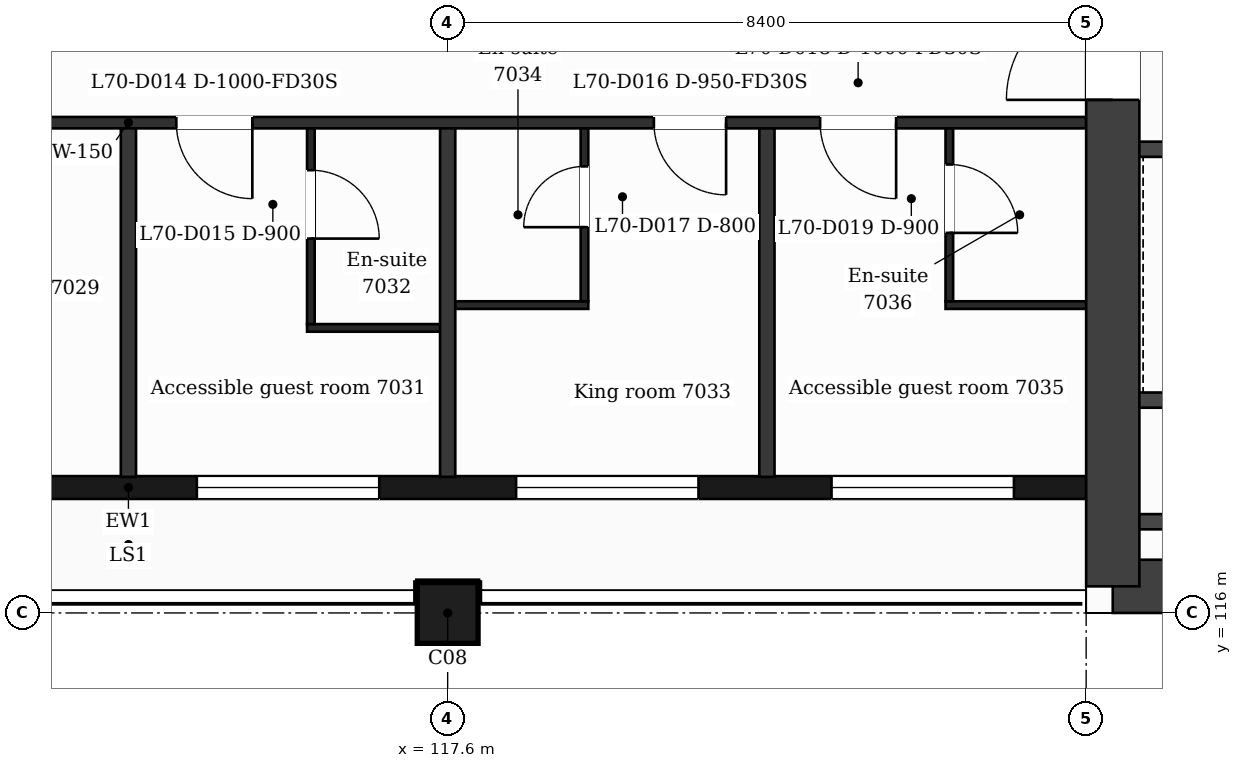
"""IFC4 building model, lengths in metres.
Left out: names, types, materials, properties, quantities, classifications, styles, units other than length and angle.
Written with IfcOpenShell. Run it as: python <this file> out.ifc"""

import sys

from ifc_helpers import new_model, si_unit, direction, frame, frame_2d, origin, origin_2d, place, context, subcontext, project, spatial, rectangle, extrude, element, fill, save


model = new_model("IFC4")
c1 = context("Model", 3, precision=1e-05, world=origin(), true_north=direction((0.0, 1.0)))
c2 = subcontext(c1, "Body", "Model", "MODEL_VIEW")
j1 = project(units=[si_unit("LENGTHUNIT", "METRE"), si_unit("PLANEANGLEUNIT", "RADIAN")], contexts=[c1])
p1 = place(None, origin())
s1 = spatial("IfcSite", under=j1, at=p1, CompositionType="ELEMENT")
p2 = place(p1, origin())
s2 = spatial("IfcBuilding", under=s1, at=p2, CompositionType="ELEMENT")
p3 = place(p2, frame((0.0, 0.0, 288.6)))
s3 = spatial("IfcBuildingStorey", under=s2, at=p3, CompositionType="ELEMENT", Elevation=288.6)
p4 = place(p3, frame((139.977, 116.35, 0.0), z_axis=(0.0, 0.0, 1.0), x_axis=(-1.0, 0.0, 0.0)))
e1 = element("IfcWall", 1, at=p4, inside=s3, PredefinedType="SHEAR", context=c2, shape_type="SweptSolid", body=[
    extrude(rectangle(XDim=13.626, YDim=0.7, at=frame_2d((6.813, 0.0))), origin(), (0.0, 0.0, 1.0), 3.7),
])
p5 = place(p3, frame((126.35, 116.35, 0.0), z_axis=(0.0, 0.0, 1.0), x_axis=(0.0, 1.0, 0.0)))
e2 = element("IfcWall", 2, at=p5, inside=s3, PredefinedType="SHEAR", context=c2, shape_type="SweptSolid", body=[
    extrude(rectangle(XDim=15.7, YDim=0.7, at=frame_2d((7.85, 0.0))), origin(), (0.0, 0.0, 1.0), 3.7),
])
p6 = place(p5, frame((6.4, 0.0, 0.0)))
e3 = element("IfcOpeningElement", 3, at=p6, cuts=e2, PredefinedType="OPENING", context=c2, shape_type="SweptSolid", body=[
    extrude(rectangle(XDim=1.4, YDim=2.1, at=frame_2d((0.7, 1.05))), frame((0.0, 0.36, 0.0), z_axis=(0.0, -1.0, 0.0), x_axis=(1.0, 0.0, 0.0)), (0.0, 0.0, 1.0), 0.72),
])
p7 = place(p3, frame((117.6, 116.0, 0.0), z_axis=(0.0, 0.0, 1.0), x_axis=(1.0, 0.0, 0.0)))
e4 = element("IfcColumn", 4, at=p7, inside=s3, PredefinedType="COLUMN", context=c2, shape_type="SweptSolid", body=[
    extrude(rectangle(XDim=0.8, YDim=0.8, at=origin_2d()), origin(), (0.0, 0.0, 1.0), 3.7),
])
p8 = place(p3, frame((100.8, 117.65, 0.0), z_axis=(0.0, 0.0, 1.0), x_axis=(1.0, 0.0, 0.0)))
e5 = element("IfcWall", 5, at=p8, inside=s3, PredefinedType="SOLIDWALL", context=c2, shape_type="SweptSolid", body=[
    extrude(rectangle(XDim=25.2, YDim=0.3, at=frame_2d((12.6, 0.0))), origin(), (0.0, 0.0, 1.0), 3.38),
])
p9 = place(p8, frame((1.55, 0.0, 0.9)))
e6 = element("IfcOpeningElement", 6, at=p9, cuts=e5, PredefinedType="OPENING", context=c2, shape_type="SweptSolid", body=[
    extrude(rectangle(XDim=1.2, YDim=2.1, at=frame_2d((0.6, 1.05))), frame((0.0, 0.16, 0.0), z_axis=(0.0, -1.0, 0.0), x_axis=(1.0, 0.0, 0.0)), (0.0, 0.0, 1.0), 0.32),
])
p10 = place(p8, frame((5.1, 0.0, 0.9)))
e7 = element("IfcOpeningElement", 7, at=p10, cuts=e5, PredefinedType="OPENING", context=c2, shape_type="SweptSolid", body=[
    extrude(rectangle(XDim=2.4, YDim=2.1, at=frame_2d((1.2, 1.05))), frame((0.0, 0.16, 0.0), z_axis=(0.0, -1.0, 0.0), x_axis=(1.0, 0.0, 0.0)), (0.0, 0.0, 1.0), 0.32),
])
p11 = place(p8, frame((9.9, 0.0, 0.0)))
e8 = element("IfcOpeningElement", 8, at=p11, cuts=e5, PredefinedType="OPENING", context=c2, shape_type="SweptSolid", body=[
    extrude(rectangle(XDim=1.2, YDim=2.4, at=frame_2d((0.6, 1.2))), frame((0.0, 0.16, 0.0), z_axis=(0.0, -1.0, 0.0), x_axis=(1.0, 0.0, 0.0)), (0.0, 0.0, 1.0), 0.32),
])
p12 = place(p8, frame((13.5, 0.0, 0.9)))
e9 = element("IfcOpeningElement", 9, at=p12, cuts=e5, PredefinedType="OPENING", context=c2, shape_type="SweptSolid", body=[
    extrude(rectangle(XDim=2.4, YDim=2.1, at=frame_2d((1.2, 1.05))), frame((0.0, 0.16, 0.0), z_axis=(0.0, -1.0, 0.0), x_axis=(1.0, 0.0, 0.0)), (0.0, 0.0, 1.0), 0.32),
])
p13 = place(p8, frame((17.7, 0.0, 0.9)))
e10 = element("IfcOpeningElement", 10, at=p13, cuts=e5, PredefinedType="OPENING", context=c2, shape_type="SweptSolid", body=[
    extrude(rectangle(XDim=2.4, YDim=2.1, at=frame_2d((1.2, 1.05))), frame((0.0, 0.16, 0.0), z_axis=(0.0, -1.0, 0.0), x_axis=(1.0, 0.0, 0.0)), (0.0, 0.0, 1.0), 0.32),
])
p14 = place(p8, frame((21.85, 0.0, 0.9)))
e11 = element("IfcOpeningElement", 11, at=p14, cuts=e5, PredefinedType="OPENING", context=c2, shape_type="SweptSolid", body=[
    extrude(rectangle(XDim=2.4, YDim=2.1, at=frame_2d((1.2, 1.05))), frame((0.0, 0.16, 0.0), z_axis=(0.0, -1.0, 0.0), x_axis=(1.0, 0.0, 0.0)), (0.0, 0.0, 1.0), 0.32),
])
for number, where, z_axis, x_axis in (
    (12, (126.7, 117.2, 0.0), (0.0, 0.0, 1.0), (1.0, 0.0, 0.0)),
    (13, (126.7, 118.8, 0.0), (0.0, 0.0, 1.0), (1.0, 0.0, 0.0)),
):
    element("IfcWall", number, at=place(p3, frame(where, z_axis=z_axis, x_axis=x_axis)), inside=s3, PredefinedType="PARTITIONING", context=c2, shape_type="SweptSolid", body=[
        extrude(rectangle(XDim=4.873, YDim=0.2, at=frame_2d((2.437, 0.0))), origin(), (0.0, 0.0, 1.0), 3.38),
    ])
p15 = place(p3, frame((115.75, 119.75, 0.0), z_axis=(0.0, 0.0, 1.0), x_axis=(1.0, 0.0, 0.0)))
e14 = element("IfcWall", 14, at=p15, inside=s3, PredefinedType="PARTITIONING", context=c2, shape_type="SweptSolid", body=[
    extrude(rectangle(XDim=1.85, YDim=0.1, at=frame_2d((0.925, 0.0))), origin(), (0.0, 0.0, 1.0), 3.38),
])
p16 = place(p3, frame((117.6, 120.05, 0.0), z_axis=(0.0, 0.0, 1.0), x_axis=(1.0, 0.0, 0.0)))
e15 = element("IfcWall", 15, at=p16, inside=s3, PredefinedType="PARTITIONING", context=c2, shape_type="SweptSolid", body=[
    extrude(rectangle(XDim=1.85, YDim=0.1, at=frame_2d((0.925, 0.0))), origin(), (0.0, 0.0, 1.0), 3.38),
])
p17 = place(p3, frame((124.15, 120.05, 0.0), z_axis=(0.0, 0.0, 1.0), x_axis=(1.0, 0.0, 0.0)))
e16 = element("IfcWall", 16, at=p17, inside=s3, PredefinedType="PARTITIONING", context=c2, shape_type="SweptSolid", body=[
    extrude(rectangle(XDim=1.85, YDim=0.1, at=frame_2d((0.925, 0.0))), origin(), (0.0, 0.0, 1.0), 3.38),
])
p18 = place(p3, frame((126.7, 122.1, 0.0), z_axis=(0.0, 0.0, 1.0), x_axis=(1.0, 0.0, 0.0)))
e17 = element("IfcWall", 17, at=p18, inside=s3, PredefinedType="PARTITIONING", context=c2, shape_type="SweptSolid", body=[
    extrude(rectangle(XDim=4.873, YDim=0.2, at=frame_2d((2.437, 0.0))), origin(), (0.0, 0.0, 1.0), 3.38),
])
p19 = place(p18, frame((3.105, 0.0, 0.0)))
e18 = element("IfcOpeningElement", 18, at=p19, cuts=e17, PredefinedType="OPENING", context=c2, shape_type="SweptSolid", body=[
    extrude(rectangle(XDim=1.1, YDim=2.1, at=frame_2d((0.55, 1.05))), frame((0.0, 0.11, 0.0), z_axis=(0.0, -1.0, 0.0), x_axis=(1.0, 0.0, 0.0)), (0.0, 0.0, 1.0), 0.22),
])
p20 = place(p18, frame((0.732, 0.0, 0.0)))
e19 = element("IfcOpeningElement", 19, at=p20, cuts=e17, PredefinedType="OPENING", context=c2, shape_type="SweptSolid", body=[
    extrude(rectangle(XDim=1.1, YDim=2.1, at=frame_2d((0.55, 1.05))), frame((0.0, 0.11, 0.0), z_axis=(0.0, -1.0, 0.0), x_axis=(1.0, 0.0, 0.0)), (0.0, 0.0, 1.0), 0.22),
])
p21 = place(p3, frame((100.8, 122.45, 0.0), z_axis=(0.0, 0.0, 1.0), x_axis=(1.0, 0.0, 0.0)))
e20 = element("IfcWall", 20, at=p21, inside=s3, PredefinedType="PARTITIONING", context=c2, shape_type="SweptSolid", body=[
    extrude(rectangle(XDim=25.2, YDim=0.15, at=frame_2d((12.6, 0.0))), origin(), (0.0, 0.0, 1.0), 3.38),
])
p22 = place(p21, frame((0.55, 0.0, 0.0)))
e21 = element("IfcOpeningElement", 21, at=p22, cuts=e20, PredefinedType="OPENING", context=c2, shape_type="SweptSolid", body=[
    extrude(rectangle(XDim=1.0, YDim=2.1, at=frame_2d((0.5, 1.05))), frame((0.0, 0.085, 0.0), z_axis=(0.0, -1.0, 0.0), x_axis=(1.0, 0.0, 0.0)), (0.0, 0.0, 1.0), 0.17),
])
p23 = place(p21, frame((9.375, 0.0, 0.0)))
e22 = element("IfcOpeningElement", 22, at=p23, cuts=e20, PredefinedType="OPENING", context=c2, shape_type="SweptSolid", body=[
    extrude(rectangle(XDim=1.0, YDim=2.1, at=frame_2d((0.5, 1.05))), frame((0.0, 0.085, 0.0), z_axis=(0.0, -1.0, 0.0), x_axis=(1.0, 0.0, 0.0)), (0.0, 0.0, 1.0), 0.17),
])
p24 = place(p21, frame((13.23, 0.0, 0.0)))
e23 = element("IfcOpeningElement", 23, at=p24, cuts=e20, PredefinedType="OPENING", context=c2, shape_type="SweptSolid", body=[
    extrude(rectangle(XDim=1.0, YDim=2.1, at=frame_2d((0.5, 1.05))), frame((0.0, 0.085, 0.0), z_axis=(0.0, -1.0, 0.0), x_axis=(1.0, 0.0, 0.0)), (0.0, 0.0, 1.0), 0.17),
])
p25 = place(p21, frame((19.513, 0.0, 0.0)))
e24 = element("IfcOpeningElement", 24, at=p25, cuts=e20, PredefinedType="OPENING", context=c2, shape_type="SweptSolid", body=[
    extrude(rectangle(XDim=0.95, YDim=2.1, at=frame_2d((0.475, 1.05))), frame((0.0, 0.085, 0.0), z_axis=(0.0, -1.0, 0.0), x_axis=(1.0, 0.0, 0.0)), (0.0, 0.0, 1.0), 0.17),
])
p26 = place(p21, frame((21.7, 0.0, 0.0)))
e25 = element("IfcOpeningElement", 25, at=p26, cuts=e20, PredefinedType="OPENING", context=c2, shape_type="SweptSolid", body=[
    extrude(rectangle(XDim=1.0, YDim=2.1, at=frame_2d((0.5, 1.05))), frame((0.0, 0.085, 0.0), z_axis=(0.0, -1.0, 0.0), x_axis=(1.0, 0.0, 0.0)), (0.0, 0.0, 1.0), 0.17),
])
p27 = place(p3, frame((113.4, 117.79, 0.0), z_axis=(0.0, 0.0, 1.0), x_axis=(0.0, 1.0, 0.0)))
e26 = element("IfcWall", 26, at=p27, inside=s3, PredefinedType="PARTITIONING", context=c2, shape_type="SweptSolid", body=[
    extrude(rectangle(XDim=4.585, YDim=0.2, at=frame_2d((2.292, 0.0))), origin(), (0.0, 0.0, 1.0), 3.38),
])
p28 = place(p3, frame((115.8, 119.8, 0.0), z_axis=(0.0, 0.0, 1.0), x_axis=(0.0, 1.0, 0.0)))
e27 = element("IfcWall", 27, at=p28, inside=s3, PredefinedType="PARTITIONING", context=c2, shape_type="SweptSolid", body=[
    extrude(rectangle(XDim=2.575, YDim=0.1, at=frame_2d((1.288, 0.0))), origin(), (0.0, 0.0, 1.0), 3.38),
])
p29 = place(p28, frame((1.125, 0.0, 0.0)))
e28 = element("IfcOpeningElement", 28, at=p29, cuts=e27, PredefinedType="OPENING", context=c2, shape_type="SweptSolid", body=[
    extrude(rectangle(XDim=0.9, YDim=2.1, at=frame_2d((0.45, 1.05))), frame((0.0, 0.06, 0.0), z_axis=(0.0, -1.0, 0.0), x_axis=(1.0, 0.0, 0.0)), (0.0, 0.0, 1.0), 0.12),
])
p30 = place(p3, frame((117.6, 117.79, 0.0), z_axis=(0.0, 0.0, 1.0), x_axis=(0.0, 1.0, 0.0)))
e29 = element("IfcWall", 29, at=p30, inside=s3, PredefinedType="PARTITIONING", context=c2, shape_type="SweptSolid", body=[
    extrude(rectangle(XDim=4.585, YDim=0.2, at=frame_2d((2.292, 0.0))), origin(), (0.0, 0.0, 1.0), 3.38),
])
p31 = place(p3, frame((119.4, 120.1, 0.0), z_axis=(0.0, 0.0, 1.0), x_axis=(0.0, 1.0, 0.0)))
e30 = element("IfcWall", 30, at=p31, inside=s3, PredefinedType="PARTITIONING", context=c2, shape_type="SweptSolid", body=[
    extrude(rectangle(XDim=2.275, YDim=0.1, at=frame_2d((1.137, 0.0))), origin(), (0.0, 0.0, 1.0), 3.38),
])
p32 = place(p31, frame((0.975, 0.0, 0.0)))
e31 = element("IfcOpeningElement", 31, at=p32, cuts=e30, PredefinedType="OPENING", context=c2, shape_type="SweptSolid", body=[
    extrude(rectangle(XDim=0.8, YDim=2.1, at=frame_2d((0.4, 1.05))), frame((0.0, 0.06, 0.0), z_axis=(0.0, -1.0, 0.0), x_axis=(1.0, 0.0, 0.0)), (0.0, 0.0, 1.0), 0.12),
])
p33 = place(p3, frame((121.8, 117.79, 0.0), z_axis=(0.0, 0.0, 1.0), x_axis=(0.0, 1.0, 0.0)))
e32 = element("IfcWall", 32, at=p33, inside=s3, PredefinedType="PARTITIONING", context=c2, shape_type="SweptSolid", body=[
    extrude(rectangle(XDim=4.585, YDim=0.2, at=frame_2d((2.292, 0.0))), origin(), (0.0, 0.0, 1.0), 3.38),
])
p34 = place(p3, frame((124.2, 120.1, 0.0), z_axis=(0.0, 0.0, 1.0), x_axis=(0.0, 1.0, 0.0)))
e33 = element("IfcWall", 33, at=p34, inside=s3, PredefinedType="PARTITIONING", context=c2, shape_type="SweptSolid", body=[
    extrude(rectangle(XDim=2.275, YDim=0.1, at=frame_2d((1.137, 0.0))), origin(), (0.0, 0.0, 1.0), 3.38),
])
p35 = place(p34, frame((0.9, 0.0, 0.0)))
e34 = element("IfcOpeningElement", 34, at=p35, cuts=e33, PredefinedType="OPENING", context=c2, shape_type="SweptSolid", body=[
    extrude(rectangle(XDim=0.9, YDim=2.1, at=frame_2d((0.45, 1.05))), frame((0.0, 0.06, 0.0), z_axis=(0.0, -1.0, 0.0), x_axis=(1.0, 0.0, 0.0)), (0.0, 0.0, 1.0), 0.12),
])
p36 = place(p12, origin())
e35 = element("IfcWindow", 35, at=p36, inside=s3, PartitioningType="SINGLE_PANEL", PredefinedType="WINDOW", context=c2, shape_type="SweptSolid", body=[
    extrude(rectangle(XDim=2.4, YDim=2.1, at=frame_2d((1.2, 1.05))), frame((0.0, 0.03, 0.0), z_axis=(0.0, -1.0, 0.0), x_axis=(1.0, 0.0, 0.0)), (0.0, 0.0, 1.0), 0.06),
])
fill(e9, e35)
p37 = place(p13, origin())
e36 = element("IfcWindow", 36, at=p37, inside=s3, PartitioningType="SINGLE_PANEL", PredefinedType="WINDOW", context=c2, shape_type="SweptSolid", body=[
    extrude(rectangle(XDim=2.4, YDim=2.1, at=frame_2d((1.2, 1.05))), frame((0.0, 0.03, 0.0), z_axis=(0.0, -1.0, 0.0), x_axis=(1.0, 0.0, 0.0)), (0.0, 0.0, 1.0), 0.06),
])
fill(e10, e36)
p38 = place(p14, origin())
e37 = element("IfcWindow", 37, at=p38, inside=s3, PartitioningType="SINGLE_PANEL", PredefinedType="WINDOW", context=c2, shape_type="SweptSolid", body=[
    extrude(rectangle(XDim=2.4, YDim=2.1, at=frame_2d((1.2, 1.05))), frame((0.0, 0.03, 0.0), z_axis=(0.0, -1.0, 0.0), x_axis=(1.0, 0.0, 0.0)), (0.0, 0.0, 1.0), 0.06),
])
fill(e11, e37)
p39 = place(p24, origin())
e38 = element("IfcDoor", 38, at=p39, inside=s3, OperationType="SINGLE_SWING_RIGHT", PredefinedType="DOOR", context=c2, shape_type="SweptSolid", body=[
    extrude(rectangle(XDim=1.0, YDim=2.1, at=frame_2d((0.5, 1.05))), frame((0.0, 0.025, 0.0), z_axis=(0.0, -1.0, 0.0), x_axis=(1.0, 0.0, 0.0)), (0.0, 0.0, 1.0), 0.05),
])
fill(e23, e38)
p40 = place(p29, origin())
e39 = element("IfcDoor", 39, at=p40, inside=s3, OperationType="SINGLE_SWING_LEFT", PredefinedType="DOOR", context=c2, shape_type="SweptSolid", body=[
    extrude(rectangle(XDim=0.9, YDim=2.1, at=frame_2d((0.45, 1.05))), frame((0.0, 0.025, 0.0), z_axis=(0.0, -1.0, 0.0), x_axis=(1.0, 0.0, 0.0)), (0.0, 0.0, 1.0), 0.05),
])
fill(e28, e39)
p41 = place(p25, origin())
e40 = element("IfcDoor", 40, at=p41, inside=s3, OperationType="SINGLE_SWING_RIGHT", PredefinedType="DOOR", context=c2, shape_type="SweptSolid", body=[
    extrude(rectangle(XDim=0.95, YDim=2.1, at=frame_2d((0.475, 1.05))), frame((0.0, 0.025, 0.0), z_axis=(0.0, -1.0, 0.0), x_axis=(1.0, 0.0, 0.0)), (0.0, 0.0, 1.0), 0.05),
])
fill(e24, e40)
p42 = place(p32, origin())
e41 = element("IfcDoor", 41, at=p42, inside=s3, OperationType="SINGLE_SWING_LEFT", PredefinedType="DOOR", context=c2, shape_type="SweptSolid", body=[
    extrude(rectangle(XDim=0.8, YDim=2.1, at=frame_2d((0.4, 1.05))), frame((0.0, 0.025, 0.0), z_axis=(0.0, -1.0, 0.0), x_axis=(1.0, 0.0, 0.0)), (0.0, 0.0, 1.0), 0.05),
])
fill(e31, e41)
p43 = place(p26, origin())
e42 = element("IfcDoor", 42, at=p43, inside=s3, OperationType="SINGLE_SWING_RIGHT", PredefinedType="DOOR", context=c2, shape_type="SweptSolid", body=[
    extrude(rectangle(XDim=1.0, YDim=2.1, at=frame_2d((0.5, 1.05))), frame((0.0, 0.025, 0.0), z_axis=(0.0, -1.0, 0.0), x_axis=(1.0, 0.0, 0.0)), (0.0, 0.0, 1.0), 0.05),
])
fill(e25, e42)
p44 = place(p35, origin())
e43 = element("IfcDoor", 43, at=p44, inside=s3, OperationType="SINGLE_SWING_LEFT", PredefinedType="DOOR", context=c2, shape_type="SweptSolid", body=[
    extrude(rectangle(XDim=0.9, YDim=2.1, at=frame_2d((0.45, 1.05))), frame((0.0, 0.025, 0.0), z_axis=(0.0, -1.0, 0.0), x_axis=(1.0, 0.0, 0.0)), (0.0, 0.0, 1.0), 0.05),
])
fill(e34, e43)
p45 = place(p6, origin())
e44 = element("IfcDoor", 44, at=p45, inside=s3, OperationType="SINGLE_SWING_LEFT", PredefinedType="DOOR", context=c2, shape_type="SweptSolid", body=[
    extrude(rectangle(XDim=1.4, YDim=2.1, at=frame_2d((0.7, 1.05))), frame((0.0, 0.025, 0.0), z_axis=(0.0, -1.0, 0.0), x_axis=(1.0, 0.0, 0.0)), (0.0, 0.0, 1.0), 0.05),
])
fill(e3, e44)
save(model, sys.argv[1])
